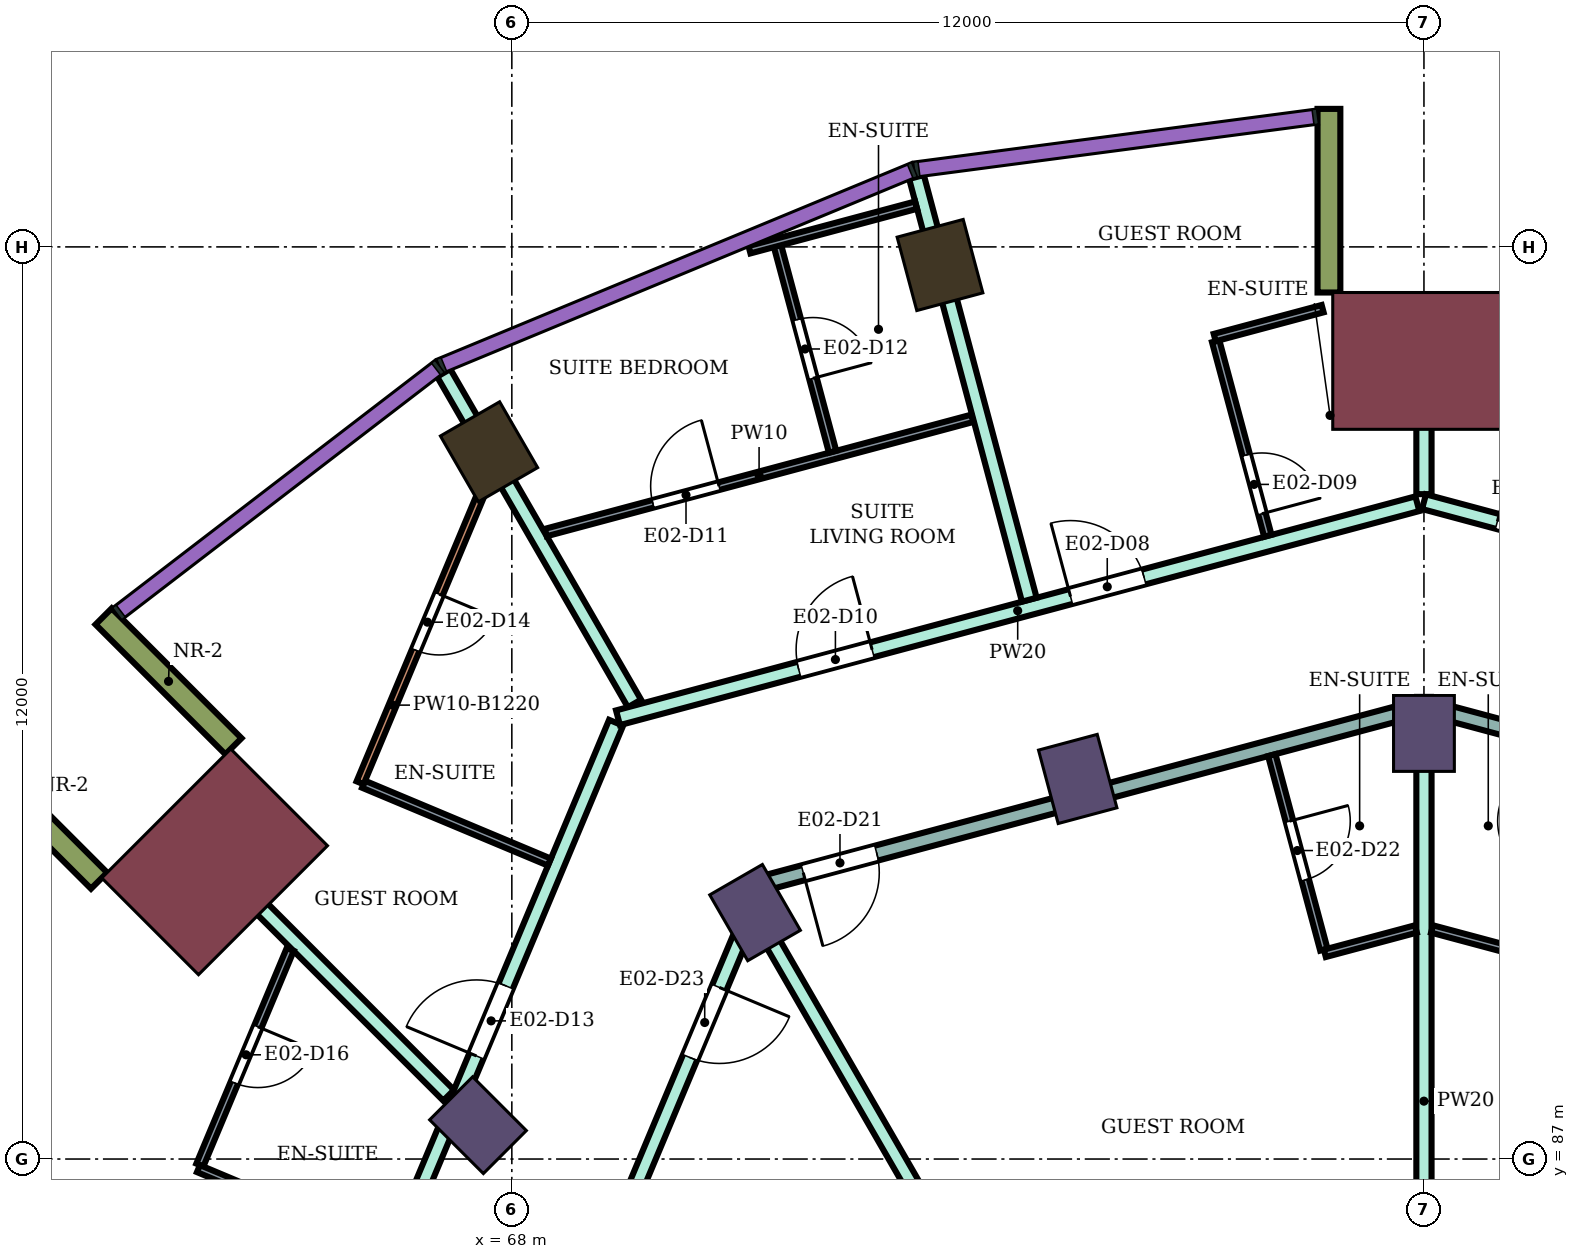
"""IFC4 building model, lengths in metres.
Left out: names, types, materials, properties, quantities, classifications, styles, units other than length and angle.
Written with IfcOpenShell. Run it as: python <this file> out.ifc"""

import sys

from ifc_helpers import new_model, si_unit, direction, frame, frame_2d, origin, origin_2d, place, context, subcontext, project, spatial, rectangle, extrude, element, fill, save


model = new_model("IFC4")
c1 = context("Model", 3, precision=1e-05, world=origin(), true_north=direction((0.0, 1.0)))
c2 = subcontext(c1, "Body", "Model", "MODEL_VIEW")
j1 = project(units=[si_unit("LENGTHUNIT", "METRE"), si_unit("PLANEANGLEUNIT", "RADIAN")], contexts=[c1])
p1 = place(None, origin())
s1 = spatial("IfcSite", under=j1, at=p1, CompositionType="ELEMENT")
p2 = place(p1, origin())
s2 = spatial("IfcBuilding", under=s1, at=p2, CompositionType="ELEMENT")
p3 = place(p2, frame((0.0, 0.0, 134.1)))
s3 = spatial("IfcBuildingStorey", under=s2, at=p3, CompositionType="ELEMENT", Elevation=134.1)
for number, where, z_axis, x_axis in (
    (1, (73.633, 98.762, 0.0), (0.0, 0.0, 1.0), (-0.259, 0.966, 0.0)),
    (2, (67.7, 96.304, 0.0), (0.0, 0.0, 1.0), (-0.5, 0.866, 0.0)),
):
    element("IfcColumn", number, at=place(p3, frame(where, z_axis=z_axis, x_axis=x_axis)), inside=s3, PredefinedType="COLUMN", context=c2, shape_type="SweptSolid", body=[
        extrude(rectangle(XDim=1.0, YDim=0.9, at=origin_2d()), origin(), (0.0, 0.0, 1.0), 3.9),
    ])
for number, where, z_axis, x_axis in (
    (3, (80.0, 92.6, 0.0), (0.0, 0.0, 1.0), (0.0, 1.0, 0.0)),
    (4, (75.445, 92.0, 0.0), (0.0, 0.0, 1.0), (-0.259, 0.966, 0.0)),
    (5, (71.2, 90.242, 0.0), (0.0, 0.0, 1.0), (-0.5, 0.866, 0.0)),
    (6, (67.555, 87.445, 0.0), (0.0, 0.0, 1.0), (-0.707, 0.707, 0.0)),
):
    element("IfcColumn", number, at=place(p3, frame(where, z_axis=z_axis, x_axis=x_axis)), inside=s3, PredefinedType="COLUMN", context=c2, shape_type="SweptSolid", body=[
        extrude(rectangle(XDim=1.0, YDim=0.8, at=origin_2d()), origin(), (0.0, 0.0, 1.0), 3.9),
    ])
for number, where, z_axis, x_axis in (
    (7, (80.0, 97.5, 0.0), (0.0, 0.0, 1.0), (0.0, 1.0, 0.0)),
    (8, (64.09, 90.91, 0.0), (0.0, 0.0, 1.0), (-0.707, 0.707, 0.0)),
):
    element("IfcColumn", number, at=place(p3, frame(where, z_axis=z_axis, x_axis=x_axis)), inside=s3, PredefinedType="COLUMN", context=c2, shape_type="SweptSolid", body=[
        extrude(rectangle(XDim=1.8, YDim=2.4, at=origin_2d()), origin(), (0.0, 0.0, 1.0), 3.9),
    ])
for number, where, z_axis, x_axis in (
    (9, (78.75, 98.4, 0.0), (0.0, 0.0, 1.0), (0.0, 1.0, 0.0)),
    (10, (64.338, 92.43, 0.0), (0.0, 0.0, 1.0), (-0.707, 0.707, 0.0)),
    (11, (62.57, 90.662, 0.0), (0.0, 0.0, 1.0), (-0.707, 0.707, 0.0)),
):
    element("IfcWall", number, at=place(p3, frame(where, z_axis=z_axis, x_axis=x_axis)), inside=s3, PredefinedType="NOTDEFINED", context=c2, shape_type="SweptSolid", body=[
        extrude(rectangle(XDim=2.416, YDim=0.3, at=frame_2d((1.208, 0.0))), origin(), (0.0, 0.0, 1.0), 3.9),
    ])
p4 = place(p3, frame((63.6, 91.409, 0.0), z_axis=(0.0, 0.0, 1.0), x_axis=(0.706937509868, -0.707276011993, 0.0)))
e12 = element("IfcWall", 12, at=p4, inside=s3, PredefinedType="PARTITIONING", context=c2, shape_type="SweptSolid", body=[
    extrude(rectangle(XDim=5.049, YDim=0.2, at=frame_2d((2.524, 0.0))), origin(), (0.0, 0.0, 1.0), 3.45),
])
p5 = place(p3, frame((66.085, 84.9, 0.0), z_axis=(0.0, 0.0, 1.0), x_axis=(0.386617151403, 0.922240303956, 0.0)))
e13 = element("IfcWall", 13, at=p5, inside=s3, PredefinedType="PARTITIONING", context=c2, shape_type="SweptSolid", body=[
    extrude(rectangle(XDim=8.5, YDim=0.2, at=frame_2d((4.25, 0.0))), origin(), (0.0, 0.0, 1.0), 3.45),
])
p6 = place(p5, frame((3.748, 0.0, 0.0)))
e14 = element("IfcOpeningElement", 14, at=p6, cuts=e13, PredefinedType="OPENING", context=c2, shape_type="SweptSolid", body=[
    extrude(rectangle(XDim=1.0, YDim=2.1, at=frame_2d((0.5, 1.05))), frame((0.0, 0.11, 0.0), z_axis=(0.0, -1.0, 0.0), x_axis=(1.0, 0.0, 0.0)), (0.0, 0.0, 1.0), 0.22),
])
p7 = place(p3, frame((67.104, 97.343, 0.0), z_axis=(0.0, 0.0, 1.0), x_axis=(0.499893606134, -0.866086821598, 0.0)))
e15 = element("IfcWall", 15, at=p7, inside=s3, PredefinedType="PARTITIONING", context=c2, shape_type="SweptSolid", body=[
    extrude(rectangle(XDim=5.021, YDim=0.2, at=frame_2d((2.511, 0.0))), origin(), (0.0, 0.0, 1.0), 3.45),
])
p8 = place(p3, frame((68.277, 83.4, 0.0), z_axis=(0.0, 0.0, 1.0), x_axis=(0.386454861164, 0.922308321703, 0.0)))
e16 = element("IfcWall", 16, at=p8, inside=s3, PredefinedType="PARTITIONING", context=c2, shape_type="SweptSolid", body=[
    extrude(rectangle(XDim=7.762, YDim=0.2, at=frame_2d((3.881, 0.0))), origin(), (0.0, 0.0, 1.0), 3.45),
])
p9 = place(p8, frame((5.351, 0.0, 0.0)))
e17 = element("IfcOpeningElement", 17, at=p9, cuts=e16, PredefinedType="OPENING", context=c2, shape_type="SweptSolid", body=[
    extrude(rectangle(XDim=1.0, YDim=2.1, at=frame_2d((0.5, 1.05))), frame((0.0, 0.11, 0.0), z_axis=(0.0, -1.0, 0.0), x_axis=(1.0, 0.0, 0.0)), (0.0, 0.0, 1.0), 0.22),
])
p10 = place(p3, frame((69.397, 92.805, 0.0), z_axis=(0.0, 0.0, 1.0), x_axis=(0.965971666602, 0.258647906087, 0.0)))
e18 = element("IfcWall", 18, at=p10, inside=s3, PredefinedType="PARTITIONING", context=c2, shape_type="SweptSolid", body=[
    extrude(rectangle(XDim=10.887, YDim=0.2, at=frame_2d((5.443, 0.0))), origin(), (0.0, 0.0, 1.0), 3.45),
])
p11 = place(p10, frame((6.163, 0.0, 0.0)))
e19 = element("IfcOpeningElement", 19, at=p11, cuts=e18, PredefinedType="OPENING", context=c2, shape_type="SweptSolid", body=[
    extrude(rectangle(XDim=1.0, YDim=2.1, at=frame_2d((0.5, 1.05))), frame((0.0, 0.11, 0.0), z_axis=(0.0, -1.0, 0.0), x_axis=(1.0, 0.0, 0.0)), (0.0, 0.0, 1.0), 0.22),
])
p12 = place(p10, frame((2.461, 0.0, 0.0)))
e20 = element("IfcOpeningElement", 20, at=p12, cuts=e18, PredefinedType="OPENING", context=c2, shape_type="SweptSolid", body=[
    extrude(rectangle(XDim=1.0, YDim=2.1, at=frame_2d((0.5, 1.05))), frame((0.0, 0.11, 0.0), z_axis=(0.0, -1.0, 0.0), x_axis=(1.0, 0.0, 0.0)), (0.0, 0.0, 1.0), 0.22),
])
p13 = place(p3, frame((71.263, 90.135, 0.0), z_axis=(0.0, 0.0, 1.0), x_axis=(0.499869438034, -0.86610077065, 0.0)))
e21 = element("IfcWall", 21, at=p13, inside=s3, PredefinedType="PARTITIONING", context=c2, shape_type="SweptSolid", body=[
    extrude(rectangle(XDim=9.777, YDim=0.2, at=frame_2d((4.889, 0.0))), origin(), (0.0, 0.0, 1.0), 3.45),
])
p14 = place(p3, frame((71.303, 90.625, 0.0), z_axis=(0.0, 0.0, 1.0), x_axis=(0.965971868307, 0.258647152776, 0.0)))
e22 = element("IfcWall", 22, at=p14, inside=s3, PredefinedType="PARTITIONING", context=c2, shape_type="SweptSolid", body=[
    extrude(rectangle(XDim=8.874, YDim=0.2, at=frame_2d((4.437, 0.0))), origin(), (0.0, 0.0, 1.0), 3.08),
])
p15 = place(p14, frame((0.55, 0.0, 0.0)))
e23 = element("IfcOpeningElement", 23, at=p15, cuts=e22, PredefinedType="OPENING", context=c2, shape_type="SweptSolid", body=[
    extrude(rectangle(XDim=1.0, YDim=2.1, at=frame_2d((0.5, 1.05))), frame((0.0, 0.11, 0.0), z_axis=(0.0, -1.0, 0.0), x_axis=(1.0, 0.0, 0.0)), (0.0, 0.0, 1.0), 0.22),
])
p16 = place(p3, frame((73.324, 99.919, 0.0), z_axis=(0.0, 0.0, 1.0), x_axis=(0.257855371794, -0.966183526685, 0.0)))
e24 = element("IfcWall", 24, at=p16, inside=s3, PredefinedType="PARTITIONING", context=c2, shape_type="SweptSolid", body=[
    extrude(rectangle(XDim=5.756, YDim=0.2, at=frame_2d((2.878, 0.0))), origin(), (0.0, 0.0, 1.0), 3.45),
])
p17 = place(p3, frame((80.0, 82.699, 0.0), z_axis=(0.0, 0.0, 1.0), x_axis=(0.0, 1.0, 0.0)))
e25 = element("IfcWall", 25, at=p17, inside=s3, PredefinedType="PARTITIONING", context=c2, shape_type="SweptSolid", body=[
    extrude(rectangle(XDim=10.125, YDim=0.2, at=frame_2d((5.062, 0.0))), origin(), (0.0, 0.0, 1.0), 3.45),
])
p18 = place(p3, frame((80.0, 92.954, 0.0), z_axis=(0.0, 0.0, 1.0), x_axis=(0.96592536278, -0.258820774936, 0.0)))
e26 = element("IfcWall", 26, at=p18, inside=s3, PredefinedType="PARTITIONING", context=c2, shape_type="SweptSolid", body=[
    extrude(rectangle(XDim=8.934, YDim=0.2, at=frame_2d((4.467, 0.0))), origin(), (0.0, 0.0, 1.0), 3.08),
])
p19 = place(p18, frame((7.454, 0.0, 0.0)))
e27 = element("IfcOpeningElement", 27, at=p19, cuts=e26, PredefinedType="OPENING", context=c2, shape_type="SweptSolid", body=[
    extrude(rectangle(XDim=1.0, YDim=2.1, at=frame_2d((0.5, 1.05))), frame((0.0, 0.11, 0.0), z_axis=(0.0, -1.0, 0.0), x_axis=(1.0, 0.0, 0.0)), (0.0, 0.0, 1.0), 0.22),
])
p20 = place(p3, frame((80.0, 95.747, 0.0), z_axis=(0.0, 0.0, 1.0), x_axis=(0.0, 1.0, 0.0)))
e28 = element("IfcWall", 28, at=p20, inside=s3, PredefinedType="PARTITIONING", context=c2, shape_type="SweptSolid", body=[
    extrude(rectangle(XDim=2.452, YDim=0.2, at=frame_2d((1.226, 0.0))), origin(), (0.0, 0.0, 1.0), 3.45),
])
p21 = place(p3, frame((80.0, 95.648, 0.0), z_axis=(0.0, 0.0, 1.0), x_axis=(0.965852259202, -0.259093445292, 0.0)))
e29 = element("IfcWall", 29, at=p21, inside=s3, PredefinedType="PARTITIONING", context=c2, shape_type="SweptSolid", body=[
    extrude(rectangle(XDim=10.597, YDim=0.2, at=frame_2d((5.298, 0.0))), origin(), (0.0, 0.0, 1.0), 3.45),
])
p22 = place(p21, frame((1.0, 0.0, 0.0)))
e30 = element("IfcOpeningElement", 30, at=p22, cuts=e29, PredefinedType="OPENING", context=c2, shape_type="SweptSolid", body=[
    extrude(rectangle(XDim=1.0, YDim=2.1, at=frame_2d((0.5, 1.05))), frame((0.0, 0.11, 0.0), z_axis=(0.0, -1.0, 0.0), x_axis=(1.0, 0.0, 0.0)), (0.0, 0.0, 1.0), 0.22),
])
p23 = place(p3, frame((63.896, 86.92, 0.0), z_axis=(0.0, 0.0, 1.0), x_axis=(0.386637413037, 0.922231809709, 0.0)))
e31 = element("IfcWall", 31, at=p23, inside=s3, PredefinedType="PARTITIONING", context=c2, shape_type="SweptSolid", body=[
    extrude(rectangle(XDim=3.076, YDim=0.1, at=frame_2d((1.538, 0.0))), origin(), (0.0, 0.0, 1.0), 3.45),
])
p24 = place(p23, frame((1.173, 0.0, 0.0)))
e32 = element("IfcOpeningElement", 32, at=p24, cuts=e31, PredefinedType="OPENING", context=c2, shape_type="SweptSolid", body=[
    extrude(rectangle(XDim=0.8, YDim=2.1, at=frame_2d((0.4, 1.05))), frame((0.0, 0.06, 0.0), z_axis=(0.0, -1.0, 0.0), x_axis=(1.0, 0.0, 0.0)), (0.0, 0.0, 1.0), 0.12),
])
p25 = place(p3, frame((63.877, 86.874, 0.0), z_axis=(0.0, 0.0, 1.0), x_axis=(0.92214860299, -0.386835823062, 0.0)))
e33 = element("IfcWall", 33, at=p25, inside=s3, PredefinedType="PARTITIONING", context=c2, shape_type="SweptSolid", body=[
    extrude(rectangle(XDim=2.7, YDim=0.1, at=frame_2d((1.35, 0.0))), origin(), (0.0, 0.0, 1.0), 3.45),
])
p26 = place(p3, frame((66.049, 91.931, 0.0), z_axis=(0.0, 0.0, 1.0), x_axis=(0.922344808264, -0.38636777126, 0.0)))
e34 = element("IfcWall", 34, at=p26, inside=s3, PredefinedType="PARTITIONING", context=c2, shape_type="SweptSolid", body=[
    extrude(rectangle(XDim=2.65, YDim=0.1, at=frame_2d((1.325, 0.0))), origin(), (0.0, 0.0, 1.0), 3.45),
])
p27 = place(p3, frame((66.004, 91.95, 0.0), z_axis=(0.0, 0.0, 1.0), x_axis=(0.386601257709, 0.922246966673, 0.0)))
e35 = element("IfcWall", 35, at=p27, inside=s3, PredefinedType="PARTITIONING", context=c2, shape_type="SweptSolid", body=[
    extrude(rectangle(XDim=4.433, YDim=0.1, at=frame_2d((2.216, 0.0))), origin(), (0.0, 0.0, 1.0), 2.68),
])
p28 = place(p27, frame((1.891, 0.0, 0.0)))
e36 = element("IfcOpeningElement", 36, at=p28, cuts=e35, PredefinedType="OPENING", context=c2, shape_type="SweptSolid", body=[
    extrude(rectangle(XDim=0.8, YDim=2.1, at=frame_2d((0.4, 1.05))), frame((0.0, 0.06, 0.0), z_axis=(0.0, -1.0, 0.0), x_axis=(1.0, 0.0, 0.0)), (0.0, 0.0, 1.0), 0.12),
])
p29 = place(p3, frame((68.447, 95.242, 0.0), z_axis=(0.0, 0.0, 1.0), x_axis=(0.965958178477, 0.258698274894, 0.0)))
e37 = element("IfcWall", 37, at=p29, inside=s3, PredefinedType="PARTITIONING", context=c2, shape_type="SweptSolid", body=[
    extrude(rectangle(XDim=5.81, YDim=0.1, at=frame_2d((2.905, 0.0))), origin(), (0.0, 0.0, 1.0), 3.45),
])
p30 = place(p29, frame((1.46, 0.0, 0.0)))
e38 = element("IfcOpeningElement", 38, at=p30, cuts=e37, PredefinedType="OPENING", context=c2, shape_type="SweptSolid", body=[
    extrude(rectangle(XDim=0.9, YDim=2.1, at=frame_2d((0.45, 1.05))), frame((0.0, 0.06, 0.0), z_axis=(0.0, -1.0, 0.0), x_axis=(1.0, 0.0, 0.0)), (0.0, 0.0, 1.0), 0.12),
])
p31 = place(p3, frame((71.459, 99.147, 0.0), z_axis=(0.0, 0.0, 1.0), x_axis=(0.258550824249, -0.965997655939, 0.0)))
e39 = element("IfcWall", 39, at=p31, inside=s3, PredefinedType="PARTITIONING", context=c2, shape_type="SweptSolid", body=[
    extrude(rectangle(XDim=2.942, YDim=0.1, at=frame_2d((1.471, 0.0))), origin(), (0.0, 0.0, 1.0), 3.45),
])
p32 = place(p31, frame((1.143, 0.0, 0.0)))
e40 = element("IfcOpeningElement", 40, at=p32, cuts=e39, PredefinedType="OPENING", context=c2, shape_type="SweptSolid", body=[
    extrude(rectangle(XDim=0.8, YDim=2.1, at=frame_2d((0.4, 1.05))), frame((0.0, 0.06, 0.0), z_axis=(0.0, -1.0, 0.0), x_axis=(1.0, 0.0, 0.0)), (0.0, 0.0, 1.0), 0.12),
])
p33 = place(p3, frame((71.126, 98.963, 0.0), z_axis=(0.0, 0.0, 1.0), x_axis=(0.966023883118, 0.258452814352, 0.0)))
e41 = element("IfcWall", 41, at=p33, inside=s3, PredefinedType="PARTITIONING", context=c2, shape_type="SweptSolid", body=[
    extrude(rectangle(XDim=2.269, YDim=0.1, at=frame_2d((1.135, 0.0))), origin(), (0.0, 0.0, 1.0), 3.45),
])
p34 = place(p3, frame((77.26, 97.759, 0.0), z_axis=(0.0, 0.0, 1.0), x_axis=(0.258935674139, -0.965894568086, 0.0)))
e42 = element("IfcWall", 42, at=p34, inside=s3, PredefinedType="PARTITIONING", context=c2, shape_type="SweptSolid", body=[
    extrude(rectangle(XDim=2.649, YDim=0.1, at=frame_2d((1.325, 0.0))), origin(), (0.0, 0.0, 1.0), 3.45),
])
p35 = place(p34, frame((1.55, 0.0, 0.0)))
e43 = element("IfcOpeningElement", 43, at=p35, cuts=e42, PredefinedType="OPENING", context=c2, shape_type="SweptSolid", body=[
    extrude(rectangle(XDim=0.8, YDim=2.1, at=frame_2d((0.4, 1.05))), frame((0.0, 0.06, 0.0), z_axis=(0.0, -1.0, 0.0), x_axis=(1.0, 0.0, 0.0)), (0.0, 0.0, 1.0), 0.12),
])
p36 = place(p3, frame((77.247, 97.807, 0.0), z_axis=(0.0, 0.0, 1.0), x_axis=(0.965900598974, 0.258913176376, 0.0)))
e44 = element("IfcWall", 44, at=p36, inside=s3, PredefinedType="PARTITIONING", context=c2, shape_type="SweptSolid", body=[
    extrude(rectangle(XDim=1.47, YDim=0.1, at=frame_2d((0.735, 0.0))), origin(), (0.0, 0.0, 1.0), 3.45),
])
p37 = place(p3, frame((77.998, 92.314, 0.0), z_axis=(0.0, 0.0, 1.0), x_axis=(0.258608674509, -0.965982170368, 0.0)))
e45 = element("IfcWall", 45, at=p37, inside=s3, PredefinedType="PARTITIONING", context=c2, shape_type="SweptSolid", body=[
    extrude(rectangle(XDim=2.65, YDim=0.1, at=frame_2d((1.325, 0.0))), origin(), (0.0, 0.0, 1.0), 3.45),
])
p38 = place(p37, frame((0.9, 0.0, 0.0)))
e46 = element("IfcOpeningElement", 46, at=p38, cuts=e45, PredefinedType="OPENING", context=c2, shape_type="SweptSolid", body=[
    extrude(rectangle(XDim=0.8, YDim=2.1, at=frame_2d((0.4, 1.05))), frame((0.0, 0.06, 0.0), z_axis=(0.0, -1.0, 0.0), x_axis=(1.0, 0.0, 0.0)), (0.0, 0.0, 1.0), 0.12),
])
p39 = place(p3, frame((78.696, 89.706, 0.0), z_axis=(0.0, 0.0, 1.0), x_axis=(0.966002513606, 0.258532674351, 0.0)))
e47 = element("IfcWall", 47, at=p39, inside=s3, PredefinedType="PARTITIONING", context=c2, shape_type="SweptSolid", body=[
    extrude(rectangle(XDim=1.24, YDim=0.1, at=frame_2d((0.62, 0.0))), origin(), (0.0, 0.0, 1.0), 3.45),
])
p40 = place(p3, frame((80.106, 90.027, 0.0), z_axis=(0.0, 0.0, 1.0), x_axis=(0.966002973184, -0.258530957139, 0.0)))
e48 = element("IfcWall", 48, at=p40, inside=s3, PredefinedType="PARTITIONING", context=c2, shape_type="SweptSolid", body=[
    extrude(rectangle(XDim=1.19, YDim=0.1, at=frame_2d((0.595, 0.0))), origin(), (0.0, 0.0, 1.0), 3.45),
])
p41 = place(p22, origin())
e49 = element("IfcDoor", 49, at=p41, inside=s3, OperationType="SINGLE_SWING_LEFT", PredefinedType="DOOR", context=c2, shape_type="SweptSolid", body=[
    extrude(rectangle(XDim=1.0, YDim=2.1, at=frame_2d((0.5, 1.05))), frame((0.0, 0.025, 0.0), z_axis=(0.0, -1.0, 0.0), x_axis=(1.0, 0.0, 0.0)), (0.0, 0.0, 1.0), 0.05),
])
fill(e30, e49)
p42 = place(p11, origin())
e50 = element("IfcDoor", 50, at=p42, inside=s3, OperationType="SINGLE_SWING_LEFT", PredefinedType="DOOR", context=c2, shape_type="SweptSolid", body=[
    extrude(rectangle(XDim=1.0, YDim=2.1, at=frame_2d((0.5, 1.05))), frame((0.0, 0.025, 0.0), z_axis=(0.0, -1.0, 0.0), x_axis=(1.0, 0.0, 0.0)), (0.0, 0.0, 1.0), 0.05),
])
fill(e19, e50)
p43 = place(p35, origin())
e51 = element("IfcDoor", 51, at=p43, inside=s3, OperationType="SINGLE_SWING_RIGHT", PredefinedType="DOOR", context=c2, shape_type="SweptSolid", body=[
    extrude(rectangle(XDim=0.8, YDim=2.1, at=frame_2d((0.4, 1.05))), frame((0.0, 0.025, 0.0), z_axis=(0.0, -1.0, 0.0), x_axis=(1.0, 0.0, 0.0)), (0.0, 0.0, 1.0), 0.05),
])
fill(e43, e51)
p44 = place(p12, origin())
e52 = element("IfcDoor", 52, at=p44, inside=s3, OperationType="SINGLE_SWING_RIGHT", PredefinedType="DOOR", context=c2, shape_type="SweptSolid", body=[
    extrude(rectangle(XDim=1.0, YDim=2.1, at=frame_2d((0.5, 1.05))), frame((0.0, 0.025, 0.0), z_axis=(0.0, -1.0, 0.0), x_axis=(1.0, 0.0, 0.0)), (0.0, 0.0, 1.0), 0.05),
])
fill(e20, e52)
p45 = place(p30, origin())
e53 = element("IfcDoor", 53, at=p45, inside=s3, OperationType="SINGLE_SWING_RIGHT", PredefinedType="DOOR", context=c2, shape_type="SweptSolid", body=[
    extrude(rectangle(XDim=0.9, YDim=2.1, at=frame_2d((0.45, 1.05))), frame((0.0, 0.025, 0.0), z_axis=(0.0, -1.0, 0.0), x_axis=(1.0, 0.0, 0.0)), (0.0, 0.0, 1.0), 0.05),
])
fill(e38, e53)
p46 = place(p32, origin())
e54 = element("IfcDoor", 54, at=p46, inside=s3, OperationType="SINGLE_SWING_RIGHT", PredefinedType="DOOR", context=c2, shape_type="SweptSolid", body=[
    extrude(rectangle(XDim=0.8, YDim=2.1, at=frame_2d((0.4, 1.05))), frame((0.0, 0.025, 0.0), z_axis=(0.0, -1.0, 0.0), x_axis=(1.0, 0.0, 0.0)), (0.0, 0.0, 1.0), 0.05),
])
fill(e40, e54)
p47 = place(p6, origin())
e55 = element("IfcDoor", 55, at=p47, inside=s3, OperationType="SINGLE_SWING_LEFT", PredefinedType="DOOR", context=c2, shape_type="SweptSolid", body=[
    extrude(rectangle(XDim=1.0, YDim=2.1, at=frame_2d((0.5, 1.05))), frame((0.0, 0.025, 0.0), z_axis=(0.0, -1.0, 0.0), x_axis=(1.0, 0.0, 0.0)), (0.0, 0.0, 1.0), 0.05),
])
fill(e14, e55)
p48 = place(p28, frame((0.8, 0.0, 0.0), z_axis=(0.0, 0.0, 1.0), x_axis=(-1.0, 0.0, 0.0)))
e56 = element("IfcDoor", 56, at=p48, inside=s3, OperationType="SINGLE_SWING_LEFT", PredefinedType="DOOR", context=c2, shape_type="SweptSolid", body=[
    extrude(rectangle(XDim=0.8, YDim=2.1, at=frame_2d((0.4, 1.05))), frame((0.0, 0.025, 0.0), z_axis=(0.0, -1.0, 0.0), x_axis=(1.0, 0.0, 0.0)), (0.0, 0.0, 1.0), 0.05),
])
fill(e36, e56)
p49 = place(p24, frame((0.8, 0.0, 0.0), z_axis=(0.0, 0.0, 1.0), x_axis=(-1.0, 0.0, 0.0)))
e57 = element("IfcDoor", 57, at=p49, inside=s3, OperationType="SINGLE_SWING_LEFT", PredefinedType="DOOR", context=c2, shape_type="SweptSolid", body=[
    extrude(rectangle(XDim=0.8, YDim=2.1, at=frame_2d((0.4, 1.05))), frame((0.0, 0.025, 0.0), z_axis=(0.0, -1.0, 0.0), x_axis=(1.0, 0.0, 0.0)), (0.0, 0.0, 1.0), 0.05),
])
fill(e32, e57)
p50 = place(p15, frame((1.0, 0.0, 0.0), z_axis=(0.0, 0.0, 1.0), x_axis=(-1.0, 0.0, 0.0)))
e58 = element("IfcDoor", 58, at=p50, inside=s3, OperationType="SINGLE_SWING_RIGHT", PredefinedType="DOOR", context=c2, shape_type="SweptSolid", body=[
    extrude(rectangle(XDim=1.0, YDim=2.1, at=frame_2d((0.5, 1.05))), frame((0.0, 0.025, 0.0), z_axis=(0.0, -1.0, 0.0), x_axis=(1.0, 0.0, 0.0)), (0.0, 0.0, 1.0), 0.05),
])
fill(e23, e58)
p51 = place(p38, origin())
e59 = element("IfcDoor", 59, at=p51, inside=s3, OperationType="SINGLE_SWING_LEFT", PredefinedType="DOOR", context=c2, shape_type="SweptSolid", body=[
    extrude(rectangle(XDim=0.8, YDim=2.1, at=frame_2d((0.4, 1.05))), frame((0.0, 0.025, 0.0), z_axis=(0.0, -1.0, 0.0), x_axis=(1.0, 0.0, 0.0)), (0.0, 0.0, 1.0), 0.05),
])
fill(e46, e59)
p52 = place(p9, frame((1.0, 0.0, 0.0), z_axis=(0.0, 0.0, 1.0), x_axis=(-1.0, 0.0, 0.0)))
e60 = element("IfcDoor", 60, at=p52, inside=s3, OperationType="SINGLE_SWING_LEFT", PredefinedType="DOOR", context=c2, shape_type="SweptSolid", body=[
    extrude(rectangle(XDim=1.0, YDim=2.1, at=frame_2d((0.5, 1.05))), frame((0.0, 0.025, 0.0), z_axis=(0.0, -1.0, 0.0), x_axis=(1.0, 0.0, 0.0)), (0.0, 0.0, 1.0), 0.05),
])
fill(e17, e60)
save(model, sys.argv[1])
